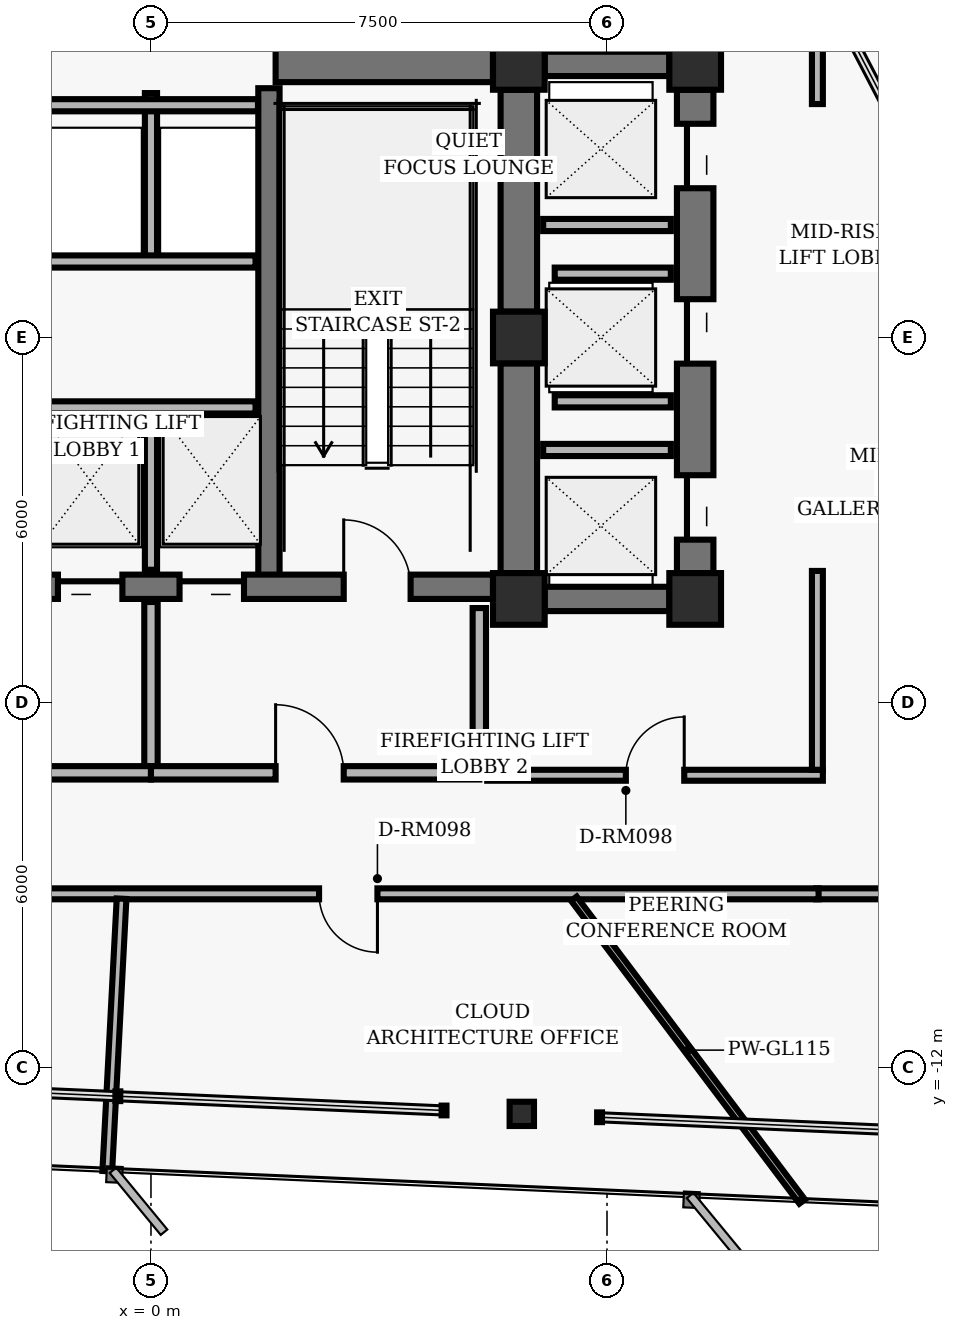
"""IFC4 building model, lengths in metres.
Left out: names, types, materials, properties, quantities, classifications, styles, units other than length and angle.
Written with IfcOpenShell. Run it as: python <this file> out.ifc"""

import sys

from ifc_helpers import new_model, si_unit, direction, frame, frame_2d, origin, origin_2d, place, context, subcontext, project, spatial, rectangle, hollow_rectangle, i_section, extrude, element, fill, save


model = new_model("IFC4")
c1 = context("Model", 3, precision=1e-05, world=origin(), true_north=direction((0.0, 1.0)))
c2 = subcontext(c1, "Body", "Model", "MODEL_VIEW")
j1 = project(units=[si_unit("LENGTHUNIT", "METRE"), si_unit("PLANEANGLEUNIT", "RADIAN")], contexts=[c1])
p1 = place(None, origin())
s1 = spatial("IfcSite", under=j1, at=p1, CompositionType="ELEMENT")
p2 = place(p1, origin())
s2 = spatial("IfcBuilding", under=s1, at=p2, CompositionType="ELEMENT")
p3 = place(p2, frame((0.0, 0.0, 141.12)))
s3 = spatial("IfcBuildingStorey", under=s2, at=p3, CompositionType="ELEMENT", Elevation=141.12)
for number, where, z_axis, x_axis in (
    (1, (6.05, 4.5, 0.0), (0.0, 0.0, 1.0), (1.0, 0.0, 0.0)),
    (2, (6.05, 0.0, 0.0), (0.0, 0.0, 1.0), (1.0, 0.0, 0.0)),
    (3, (6.05, -4.3, 0.0), (0.0, 0.0, 1.0), (1.0, 0.0, 0.0)),
    (4, (8.95, 4.5, 0.0), (0.0, 0.0, 1.0), (1.0, 0.0, 0.0)),
    (5, (8.95, -4.3, 0.0), (0.0, 0.0, 1.0), (1.0, 0.0, 0.0)),
):
    element("IfcColumn", number, at=place(p3, frame(where, z_axis=z_axis, x_axis=x_axis)), inside=s3, PredefinedType="COLUMN", context=c2, shape_type="SweptSolid", body=[
        extrude(hollow_rectangle(XDim=0.85, YDim=0.85, WallThickness=0.055, InnerFilletRadius=0.02, OuterFilletRadius=0.04, at=origin_2d()), origin(), (0.0, 0.0, 1.0), 3.04),
    ])
p4 = place(p3, frame((6.05, 0.425, 0.0), z_axis=(0.0, 0.0, 1.0), x_axis=(0.0, 1.0, 0.0)))
e6 = element("IfcWall", 6, at=p4, inside=s3, PredefinedType="SHEAR", context=c2, shape_type="SweptSolid", body=[
    extrude(rectangle(XDim=3.65, YDim=0.6, at=frame_2d((1.825, 0.0))), origin(), (0.0, 0.0, 1.0), 2.788),
])
p5 = place(p3, frame((6.05, -3.875, 0.0), z_axis=(0.0, 0.0, 1.0), x_axis=(0.0, 1.0, 0.0)))
e7 = element("IfcWall", 7, at=p5, inside=s3, PredefinedType="SHEAR", context=c2, shape_type="SweptSolid", body=[
    extrude(rectangle(XDim=3.45, YDim=0.6, at=frame_2d((1.725, 0.0))), origin(), (0.0, 0.0, 1.0), 2.788),
])
p6 = place(p3, frame((1.94, -4.1, 0.0), z_axis=(0.0, 0.0, 1.0), x_axis=(0.0, 1.0, 0.0)))
e8 = element("IfcWall", 8, at=p6, inside=s3, PredefinedType="SHEAR", context=c2, shape_type="SweptSolid", body=[
    extrude(rectangle(XDim=8.2, YDim=0.35, at=frame_2d((4.1, 0.0))), origin(), (0.0, 0.0, 1.0), 2.788),
])
p7 = place(p3, frame((-5.625, -4.1, 0.0), z_axis=(0.0, 0.0, 1.0), x_axis=(1.0, 0.0, 0.0)))
e9 = element("IfcWall", 9, at=p7, inside=s3, PredefinedType="SHEAR", context=c2, shape_type="SweptSolid", body=[
    extrude(rectangle(XDim=11.25, YDim=0.4, at=frame_2d((5.625, 0.0))), origin(), (0.0, 0.0, 1.0), 2.788),
])
p8 = place(p7, frame((1.355, 0.0, 0.0)))
e10 = element("IfcOpeningElement", 10, at=p8, cuts=e9, PredefinedType="OPENING", context=c2, shape_type="SweptSolid", body=[
    extrude(rectangle(XDim=1.1, YDim=2.04, at=frame_2d((0.55, 1.02))), frame((0.0, 0.21, 0.0), z_axis=(0.0, -1.0, 0.0), x_axis=(1.0, 0.0, 0.0)), (0.0, 0.0, 1.0), 0.42),
])
p9 = place(p7, frame((8.795, 0.0, 0.0)))
e11 = element("IfcOpeningElement", 11, at=p9, cuts=e9, PredefinedType="OPENING", context=c2, shape_type="SweptSolid", body=[
    extrude(rectangle(XDim=1.1, YDim=2.04, at=frame_2d((0.55, 1.02))), frame((0.0, 0.21, 0.0), z_axis=(0.0, -1.0, 0.0), x_axis=(1.0, 0.0, 0.0)), (0.0, 0.0, 1.0), 0.42),
])
p10 = place(p7, frame((4.095, 0.0, 0.0)))
e12 = element("IfcOpeningElement", 12, at=p10, cuts=e9, PredefinedType="OPENING", context=c2, shape_type="SweptSolid", body=[
    extrude(rectangle(XDim=1.06, YDim=2.04, at=frame_2d((0.53, 1.02))), frame((0.0, 0.21, 0.0), z_axis=(0.0, -1.0, 0.0), x_axis=(1.0, 0.0, 0.0)), (0.0, 0.0, 1.0), 0.42),
])
p11 = place(p7, frame((6.095, 0.0, 0.0)))
e13 = element("IfcOpeningElement", 13, at=p11, cuts=e9, PredefinedType="OPENING", context=c2, shape_type="SweptSolid", body=[
    extrude(rectangle(XDim=1.06, YDim=2.04, at=frame_2d((0.53, 1.02))), frame((0.0, 0.21, 0.0), z_axis=(0.0, -1.0, 0.0), x_axis=(1.0, 0.0, 0.0)), (0.0, 0.0, 1.0), 0.42),
])
p12 = place(p3, frame((2.05, 4.5, 0.0), z_axis=(0.0, 0.0, 1.0), x_axis=(1.0, 0.0, 0.0)))
e14 = element("IfcWall", 14, at=p12, inside=s3, PredefinedType="SHEAR", context=c2, shape_type="SweptSolid", body=[
    extrude(rectangle(XDim=3.575, YDim=0.6, at=frame_2d((1.788, 0.0))), origin(), (0.0, 0.0, 1.0), 2.788),
])
p13 = place(p3, frame((8.95, -3.875, 0.0), z_axis=(0.0, 0.0, 1.0), x_axis=(0.0, 1.0, 0.0)))
e15 = element("IfcWall", 15, at=p13, inside=s3, PredefinedType="SHEAR", context=c2, shape_type="SweptSolid", body=[
    extrude(rectangle(XDim=7.95, YDim=0.6, at=frame_2d((3.975, 0.0))), origin(), (0.0, 0.0, 1.0), 2.788),
])
p14 = place(p13, frame((0.55, 0.0, 0.0)))
e16 = element("IfcOpeningElement", 16, at=p14, cuts=e15, PredefinedType="OPENING", context=c2, shape_type="SweptSolid", body=[
    extrude(rectangle(XDim=1.06, YDim=2.04, at=frame_2d((0.53, 1.02))), frame((0.0, 0.31, 0.0), z_axis=(0.0, -1.0, 0.0), x_axis=(1.0, 0.0, 0.0)), (0.0, 0.0, 1.0), 0.62),
])
p15 = place(p13, frame((3.445, 0.0, 0.0)))
e17 = element("IfcOpeningElement", 17, at=p15, cuts=e15, PredefinedType="OPENING", context=c2, shape_type="SweptSolid", body=[
    extrude(rectangle(XDim=1.06, YDim=2.04, at=frame_2d((0.53, 1.02))), frame((0.0, 0.31, 0.0), z_axis=(0.0, -1.0, 0.0), x_axis=(1.0, 0.0, 0.0)), (0.0, 0.0, 1.0), 0.62),
])
p16 = place(p13, frame((6.33, 0.0, 0.0)))
e18 = element("IfcOpeningElement", 18, at=p16, cuts=e15, PredefinedType="OPENING", context=c2, shape_type="SweptSolid", body=[
    extrude(rectangle(XDim=1.06, YDim=2.04, at=frame_2d((0.53, 1.02))), frame((0.0, 0.31, 0.0), z_axis=(0.0, -1.0, 0.0), x_axis=(1.0, 0.0, 0.0)), (0.0, 0.0, 1.0), 0.62),
])
for number, where, z_axis, x_axis in (
    (19, (6.475, 4.5, 0.0), (0.0, 0.0, 1.0), (1.0, 0.0, 0.0)),
    (20, (6.475, -4.3, 0.0), (0.0, 0.0, 1.0), (1.0, 0.0, 0.0)),
):
    element("IfcWall", number, at=place(p3, frame(where, z_axis=z_axis, x_axis=x_axis)), inside=s3, PredefinedType="SHEAR", context=c2, shape_type="SweptSolid", body=[
        extrude(rectangle(XDim=2.05, YDim=0.4, at=frame_2d((1.025, 0.0))), origin(), (0.0, 0.0, 1.0), 2.788),
    ])
p17 = place(p3, frame((6.099, -12.769, 0.0), z_axis=(0.0, 0.0, 1.0), x_axis=(1.0, 0.0, 0.0)))
e21 = element("IfcColumn", 21, at=p17, inside=s3, PredefinedType="COLUMN", context=c2, shape_type="SweptSolid", body=[
    extrude(i_section(OverallWidth=0.401, OverallDepth=0.399, WebThickness=0.025, FlangeThickness=0.04, FilletRadius=0.018, at=origin_2d()), origin(), (0.0, 0.0, 1.0), 3.04),
])
p18 = place(p3, frame((0.0, -3.82, 0.0), z_axis=(0.0, 0.0, 1.0), x_axis=(0.0, 1.0, 0.0)))
e22 = element("IfcWall", 22, at=p18, inside=s3, PredefinedType="PARTITIONING", context=c2, shape_type="SweptSolid", body=[
    extrude(rectangle(XDim=2.67, YDim=0.2, at=frame_2d((1.335, 0.0))), origin(), (0.0, 0.0, 1.0), 2.763),
])
p19 = place(p3, frame((-1.72, -1.15, 0.0), z_axis=(0.0, 0.0, 1.0), x_axis=(1.0, 0.0, 0.0)))
e23 = element("IfcWall", 23, at=p19, inside=s3, PredefinedType="PARTITIONING", context=c2, shape_type="SweptSolid", body=[
    extrude(rectangle(XDim=3.44, YDim=0.2, at=frame_2d((1.72, 0.0))), origin(), (0.0, 0.0, 1.0), 2.763),
])
p20 = place(p3, frame((5.4, -7.16, 0.0), z_axis=(0.0, 0.0, 1.0), x_axis=(0.0, 1.0, 0.0)))
e24 = element("IfcWall", 24, at=p20, inside=s3, PredefinedType="PARTITIONING", context=c2, shape_type="SweptSolid", body=[
    extrude(rectangle(XDim=2.71, YDim=0.22, at=frame_2d((1.355, 0.0))), origin(), (0.0, 0.0, 1.0), 2.763),
])
p21 = place(p3, frame((0.0, -7.16, 0.0), z_axis=(0.0, 0.0, 1.0), x_axis=(0.0, 1.0, 0.0)))
e25 = element("IfcWall", 25, at=p21, inside=s3, PredefinedType="PARTITIONING", context=c2, shape_type="SweptSolid", body=[
    extrude(rectangle(XDim=2.81, YDim=0.22, at=frame_2d((1.405, 0.0))), origin(), (0.0, 0.0, 1.0), 2.763),
])
p22 = place(p3, frame((-5.4, -7.16, 0.0), z_axis=(0.0, 0.0, 1.0), x_axis=(1.0, 0.0, 0.0)))
e26 = element("IfcWall", 26, at=p22, inside=s3, PredefinedType="PARTITIONING", context=c2, shape_type="SweptSolid", body=[
    extrude(rectangle(XDim=5.4, YDim=0.22, at=frame_2d((2.7, 0.0))), origin(), (0.0, 0.0, 1.0), 2.33),
])
p23 = place(p22, frame((2.05, 0.0, 0.0)))
e27 = element("IfcOpeningElement", 27, at=p23, cuts=e26, PredefinedType="OPENING", context=c2, shape_type="SweptSolid", body=[
    extrude(rectangle(XDim=1.12, YDim=2.02, at=frame_2d((0.56, 1.01))), frame((0.0, 0.12, 0.0), z_axis=(0.0, -1.0, 0.0), x_axis=(1.0, 0.0, 0.0)), (0.0, 0.0, 1.0), 0.24),
])
p24 = place(p3, frame((0.0, -7.16, 0.0), z_axis=(0.0, 0.0, 1.0), x_axis=(1.0, 0.0, 0.0)))
e28 = element("IfcWall", 28, at=p24, inside=s3, PredefinedType="PARTITIONING", context=c2, shape_type="SweptSolid", body=[
    extrude(rectangle(XDim=5.4, YDim=0.22, at=frame_2d((2.7, 0.0))), origin(), (0.0, 0.0, 1.0), 2.33),
])
p25 = place(p24, frame((2.05, 0.0, 0.0)))
e29 = element("IfcOpeningElement", 29, at=p25, cuts=e28, PredefinedType="OPENING", context=c2, shape_type="SweptSolid", body=[
    extrude(rectangle(XDim=1.12, YDim=2.02, at=frame_2d((0.56, 1.01))), frame((0.0, 0.12, 0.0), z_axis=(0.0, -1.0, 0.0), x_axis=(1.0, 0.0, 0.0)), (0.0, 0.0, 1.0), 0.24),
])
p26 = place(p3, frame((0.0, 1.25, 0.0), z_axis=(0.0, 0.0, 1.0), x_axis=(0.0, 1.0, 0.0)))
e30 = element("IfcWall", 30, at=p26, inside=s3, PredefinedType="PARTITIONING", context=c2, shape_type="SweptSolid", body=[
    extrude(rectangle(XDim=2.77, YDim=0.2, at=frame_2d((1.385, 0.0))), origin(), (0.0, 0.0, 1.0), 2.763),
])
p27 = place(p3, frame((-1.72, 1.25, 0.0), z_axis=(0.0, 0.0, 1.0), x_axis=(1.0, 0.0, 0.0)))
e31 = element("IfcWall", 31, at=p27, inside=s3, PredefinedType="PARTITIONING", context=c2, shape_type="SweptSolid", body=[
    extrude(rectangle(XDim=3.44, YDim=0.2, at=frame_2d((1.72, 0.0))), origin(), (0.0, 0.0, 1.0), 2.763),
])
p28 = place(p3, frame((-1.76, 3.82, 0.0), z_axis=(0.0, 0.0, 1.0), x_axis=(1.0, 0.0, 0.0)))
e32 = element("IfcWall", 32, at=p28, inside=s3, PredefinedType="PARTITIONING", context=c2, shape_type="SweptSolid", body=[
    extrude(rectangle(XDim=3.52, YDim=0.2, at=frame_2d((1.76, 0.0))), origin(), (0.0, 0.0, 1.0), 2.763),
])
for number, where, z_axis, x_axis in (
    (33, (6.45, -1.85, 0.0), (0.0, 0.0, 1.0), (1.0, 0.0, 0.0)),
    (34, (6.45, 1.85, 0.0), (0.0, 0.0, 1.0), (1.0, 0.0, 0.0)),
):
    element("IfcWall", number, at=place(p3, frame(where, z_axis=z_axis, x_axis=x_axis)), inside=s3, PredefinedType="PARTITIONING", context=c2, shape_type="SweptSolid", body=[
        extrude(rectangle(XDim=2.1, YDim=0.2, at=frame_2d((1.05, 0.0))), origin(), (0.0, 0.0, 1.0), 2.763),
    ])
for number, where, z_axis, x_axis in (
    (35, (6.64, -1.05, 0.0), (0.0, 0.0, 1.0), (1.0, 0.0, 0.0)),
    (36, (6.64, 1.05, 0.0), (0.0, 0.0, 1.0), (1.0, 0.0, 0.0)),
):
    element("IfcWall", number, at=place(p3, frame(where, z_axis=z_axis, x_axis=x_axis)), inside=s3, PredefinedType="PARTITIONING", context=c2, shape_type="SweptSolid", body=[
        extrude(rectangle(XDim=1.91, YDim=0.2, at=frame_2d((0.955, 0.0))), origin(), (0.0, 0.0, 1.0), 2.763),
    ])
p29 = place(p3, frame((10.003, 9.07, 0.0), z_axis=(0.0, 0.0, 1.0), x_axis=(0.461740291408, -0.887015165198, 0.0)))
e37 = element("IfcWall", 37, at=p29, inside=s3, PredefinedType="PARTITIONING", context=c2, shape_type="SweptSolid", body=[
    extrude(rectangle(XDim=9.976, YDim=0.18, at=frame_2d((4.988, 0.0))), origin(), (0.0, 0.0, 1.0), 2.763),
])
p30 = place(p29, frame((5.689, 0.0, 0.0)))
e38 = element("IfcOpeningElement", 38, at=p30, cuts=e37, PredefinedType="OPENING", context=c2, shape_type="SweptSolid", body=[
    extrude(rectangle(XDim=0.96, YDim=2.02, at=frame_2d((0.48, 1.01))), frame((0.0, 0.1, 0.0), z_axis=(0.0, -1.0, 0.0), x_axis=(1.0, 0.0, 0.0)), (0.0, 0.0, 1.0), 0.2),
])
p31 = place(p3, frame((14.69, -9.15, 0.0), z_axis=(0.0, 0.0, 1.0), x_axis=(-1.0, 0.0, 0.0)))
e39 = element("IfcWall", 39, at=p31, inside=s3, PredefinedType="PARTITIONING", context=c2, shape_type="SweptSolid", body=[
    extrude(rectangle(XDim=3.75, YDim=0.18, at=frame_2d((1.875, 0.0))), origin(), (0.0, 0.0, 1.0), 2.33),
])
p32 = place(p3, frame((10.98, -9.15, 0.0), z_axis=(0.0, 0.0, 1.0), x_axis=(-1.0, 0.0, 0.0)))
e40 = element("IfcWall", 40, at=p32, inside=s3, PredefinedType="PARTITIONING", context=c2, shape_type="SweptSolid", body=[
    extrude(rectangle(XDim=17.5, YDim=0.18, at=frame_2d((8.75, 0.0))), origin(), (0.0, 0.0, 1.0), 2.33),
])
p33 = place(p32, frame((13.872, 0.0, 0.0)))
e41 = element("IfcOpeningElement", 41, at=p33, cuts=e40, PredefinedType="OPENING", context=c2, shape_type="SweptSolid", body=[
    extrude(rectangle(XDim=0.96, YDim=2.02, at=frame_2d((0.48, 1.01))), frame((0.0, 0.1, 0.0), z_axis=(0.0, -1.0, 0.0), x_axis=(1.0, 0.0, 0.0)), (0.0, 0.0, 1.0), 0.2),
])
p34 = place(p32, frame((7.256, 0.0, 0.0)))
e42 = element("IfcOpeningElement", 42, at=p34, cuts=e40, PredefinedType="OPENING", context=c2, shape_type="SweptSolid", body=[
    extrude(rectangle(XDim=0.96, YDim=2.02, at=frame_2d((0.48, 1.01))), frame((0.0, 0.1, 0.0), z_axis=(0.0, -1.0, 0.0), x_axis=(1.0, 0.0, 0.0)), (0.0, 0.0, 1.0), 0.2),
])
p35 = place(p3, frame((5.53, -7.2, 0.0), z_axis=(0.0, 0.0, 1.0), x_axis=(1.0, 0.0, 0.0)))
e43 = element("IfcWall", 43, at=p35, inside=s3, PredefinedType="PARTITIONING", context=c2, shape_type="SweptSolid", body=[
    extrude(rectangle(XDim=5.52, YDim=0.18, at=frame_2d((2.76, 0.0))), origin(), (0.0, 0.0, 1.0), 2.33),
])
p36 = place(p35, frame((2.28, 0.0, 0.0)))
e44 = element("IfcOpeningElement", 44, at=p36, cuts=e43, PredefinedType="OPENING", context=c2, shape_type="SweptSolid", body=[
    extrude(rectangle(XDim=0.96, YDim=2.02, at=frame_2d((0.48, 1.01))), frame((0.0, 0.1, 0.0), z_axis=(0.0, -1.0, 0.0), x_axis=(1.0, 0.0, 0.0)), (0.0, 0.0, 1.0), 0.2),
])
for number, where, z_axis, x_axis in (
    (45, (10.96, -7.11, 0.0), (0.0, 0.0, 1.0), (0.0, 1.0, 0.0)),
    (46, (10.96, 3.84, 0.0), (0.0, 0.0, 1.0), (0.0, 1.0, 0.0)),
):
    element("IfcWall", number, at=place(p3, frame(where, z_axis=z_axis, x_axis=x_axis)), inside=s3, PredefinedType="PARTITIONING", context=c2, shape_type="SweptSolid", body=[
        extrude(rectangle(XDim=3.271, YDim=0.18, at=frame_2d((1.635, 0.0))), origin(), (0.0, 0.0, 1.0), 2.763),
    ])
p37 = place(p3, frame((-0.484, -9.23, 0.0), z_axis=(0.0, 0.0, 1.0), x_axis=(-0.052321895389, -0.998630271553, 0.0)))
e47 = element("IfcWall", 47, at=p37, inside=s3, PredefinedType="PARTITIONING", context=c2, shape_type="SweptSolid", body=[
    extrude(rectangle(XDim=4.489, YDim=0.16, at=frame_2d((2.244, 0.0))), origin(), (0.0, 0.0, 1.0), 2.763),
])
p38 = place(p3, frame((6.955, -9.23, 0.0), z_axis=(0.0, 0.0, 1.0), x_axis=(0.60180827309, -0.79864059654, 0.0)))
e48 = element("IfcWall", 48, at=p38, inside=s3, PredefinedType="MOVABLE", context=c2, shape_type="SweptSolid", body=[
    extrude(rectangle(XDim=6.238, YDim=0.115, at=frame_2d((3.119, 0.0))), origin(), (0.0, 0.0, 1.0), 2.763),
])
p39 = place(p9, origin())
e49 = element("IfcDoor", 49, at=p39, inside=s3, OperationType="SINGLE_SWING_LEFT", PredefinedType="DOOR", context=c2, shape_type="SweptSolid", body=[
    extrude(rectangle(XDim=1.1, YDim=2.04, at=frame_2d((0.55, 1.02))), frame((0.0, 0.025, 0.0), z_axis=(0.0, -1.0, 0.0), x_axis=(1.0, 0.0, 0.0)), (0.0, 0.0, 1.0), 0.05),
])
fill(e11, e49)
p40 = place(p10, origin())
e50 = element("IfcDoor", 50, at=p40, inside=s3, OperationType="SLIDING_TO_LEFT", PredefinedType="DOOR", context=c2, shape_type="SweptSolid", body=[
    extrude(rectangle(XDim=1.06, YDim=2.04, at=frame_2d((0.53, 1.02))), frame((0.0, 0.025, 0.0), z_axis=(0.0, -1.0, 0.0), x_axis=(1.0, 0.0, 0.0)), (0.0, 0.0, 1.0), 0.05),
])
fill(e12, e50)
p41 = place(p11, origin())
e51 = element("IfcDoor", 51, at=p41, inside=s3, OperationType="SLIDING_TO_RIGHT", PredefinedType="DOOR", context=c2, shape_type="SweptSolid", body=[
    extrude(rectangle(XDim=1.06, YDim=2.04, at=frame_2d((0.53, 1.02))), frame((0.0, 0.025, 0.0), z_axis=(0.0, -1.0, 0.0), x_axis=(1.0, 0.0, 0.0)), (0.0, 0.0, 1.0), 0.05),
])
fill(e13, e51)
p42 = place(p25, origin())
e52 = element("IfcDoor", 52, at=p42, inside=s3, OperationType="SINGLE_SWING_LEFT", PredefinedType="DOOR", context=c2, shape_type="SweptSolid", body=[
    extrude(rectangle(XDim=1.12, YDim=2.02, at=frame_2d((0.56, 1.01))), frame((0.0, 0.025, 0.0), z_axis=(0.0, -1.0, 0.0), x_axis=(1.0, 0.0, 0.0)), (0.0, 0.0, 1.0), 0.05),
])
fill(e29, e52)
p43 = place(p14, origin())
e53 = element("IfcDoor", 53, at=p43, inside=s3, OperationType="SLIDING_TO_LEFT", PredefinedType="DOOR", context=c2, shape_type="SweptSolid", body=[
    extrude(rectangle(XDim=1.06, YDim=2.04, at=frame_2d((0.53, 1.02))), frame((0.0, 0.025, 0.0), z_axis=(0.0, -1.0, 0.0), x_axis=(1.0, 0.0, 0.0)), (0.0, 0.0, 1.0), 0.05),
])
fill(e16, e53)
p44 = place(p15, origin())
e54 = element("IfcDoor", 54, at=p44, inside=s3, OperationType="SLIDING_TO_RIGHT", PredefinedType="DOOR", context=c2, shape_type="SweptSolid", body=[
    extrude(rectangle(XDim=1.06, YDim=2.04, at=frame_2d((0.53, 1.02))), frame((0.0, 0.025, 0.0), z_axis=(0.0, -1.0, 0.0), x_axis=(1.0, 0.0, 0.0)), (0.0, 0.0, 1.0), 0.05),
])
fill(e17, e54)
p45 = place(p16, origin())
e55 = element("IfcDoor", 55, at=p45, inside=s3, OperationType="SLIDING_TO_LEFT", PredefinedType="DOOR", context=c2, shape_type="SweptSolid", body=[
    extrude(rectangle(XDim=1.06, YDim=2.04, at=frame_2d((0.53, 1.02))), frame((0.0, 0.025, 0.0), z_axis=(0.0, -1.0, 0.0), x_axis=(1.0, 0.0, 0.0)), (0.0, 0.0, 1.0), 0.05),
])
fill(e18, e55)
p46 = place(p34, origin())
e56 = element("IfcDoor", 56, at=p46, inside=s3, OperationType="SINGLE_SWING_LEFT", PredefinedType="DOOR", context=c2, shape_type="SweptSolid", body=[
    extrude(rectangle(XDim=0.96, YDim=2.02, at=frame_2d((0.48, 1.01))), frame((0.0, 0.025, 0.0), z_axis=(0.0, -1.0, 0.0), x_axis=(1.0, 0.0, 0.0)), (0.0, 0.0, 1.0), 0.05),
])
fill(e42, e56)
p47 = place(p36, origin())
e57 = element("IfcDoor", 57, at=p47, inside=s3, OperationType="SINGLE_SWING_RIGHT", PredefinedType="DOOR", context=c2, shape_type="SweptSolid", body=[
    extrude(rectangle(XDim=0.96, YDim=2.02, at=frame_2d((0.48, 1.01))), frame((0.0, 0.025, 0.0), z_axis=(0.0, -1.0, 0.0), x_axis=(1.0, 0.0, 0.0)), (0.0, 0.0, 1.0), 0.05),
])
fill(e44, e57)
save(model, sys.argv[1])
